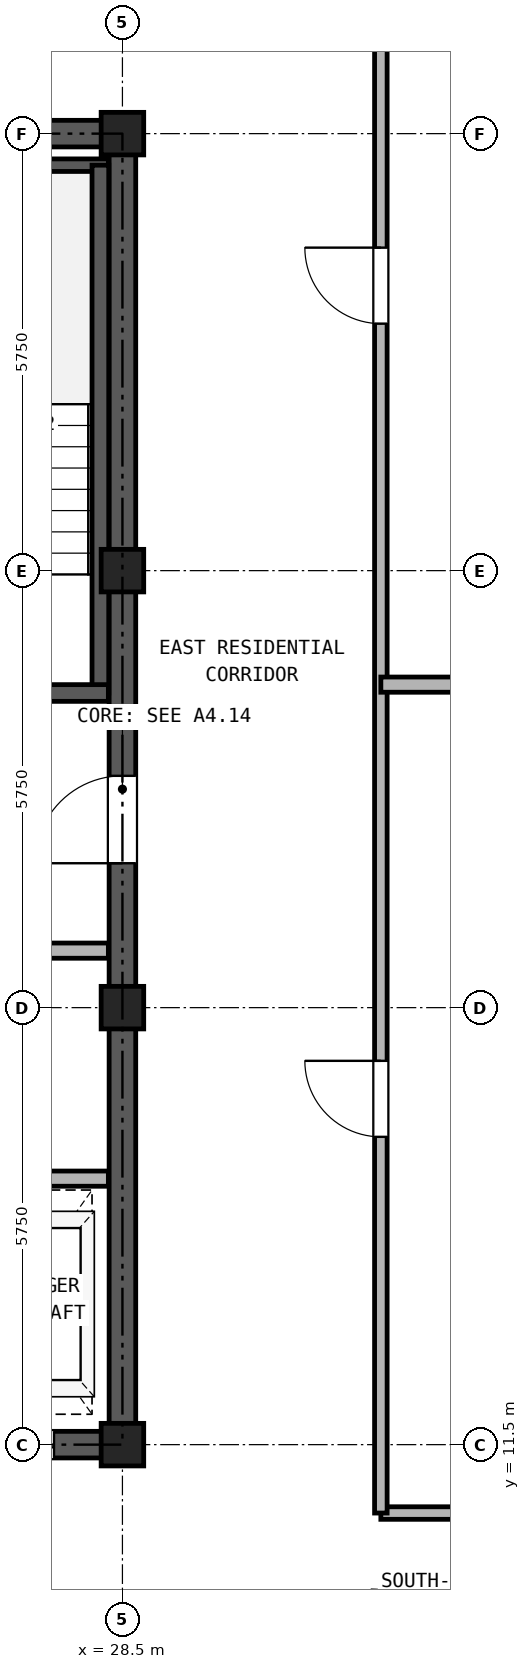
"""IFC4 building model, lengths in metres.
Left out: names, types, materials, properties, quantities, classifications, styles, units other than length and angle.
Written with IfcOpenShell. Run it as: python <this file> out.ifc"""

import sys

from ifc_helpers import new_model, si_unit, direction, frame, frame_2d, origin, origin_2d, place, context, subcontext, project, spatial, rectangle, hollow_rectangle, extrude, source, transform, mapped, element, fill, save


model = new_model("IFC4")
c1 = context("Model", 3, precision=1e-05, world=origin(), true_north=direction((0.0, 1.0)))
c2 = subcontext(c1, "Body", "Model", "MODEL_VIEW")
j1 = project(units=[si_unit("LENGTHUNIT", "METRE"), si_unit("PLANEANGLEUNIT", "RADIAN")], contexts=[c1])
p1 = place(None, origin())
s1 = spatial("IfcSite", under=j1, at=p1, CompositionType="ELEMENT")
p2 = place(p1, origin())
s2 = spatial("IfcBuilding", under=s1, at=p2, CompositionType="ELEMENT")
p3 = place(p2, frame((0.0, 0.0, 255.3)))
s3 = spatial("IfcBuildingStorey", under=s2, at=p3, CompositionType="ELEMENT", Elevation=255.3)
m1 = source(origin(), c2, "Body", "SweptSolid", [
    extrude(hollow_rectangle(XDim=0.56, YDim=0.56, WallThickness=0.03, at=origin_2d()), origin(), (0.0, 0.0, 1.0), 2.98),
])
for number, where, z_axis, x_axis in (
    (1, (28.5, 11.5, 0.0), (0.0, 0.0, 1.0), (1.0, 0.0, 0.0)),
    (2, (28.5, 17.25, 0.0), (0.0, 0.0, 1.0), (1.0, 0.0, 0.0)),
    (3, (28.5, 23.0, 0.0), (0.0, 0.0, 1.0), (1.0, 0.0, 0.0)),
    (4, (28.5, 28.75, 0.0), (0.0, 0.0, 1.0), (1.0, 0.0, 0.0)),
):
    element("IfcColumn", number, at=place(p3, frame(where, z_axis=z_axis, x_axis=x_axis)), inside=s3, PredefinedType="COLUMN", context=c2, shape_type="MappedRepresentation", body=[
        mapped(m1, transform((0.0, 0.0, 0.0), x_axis=(1.0, 0.0, 0.0), y_axis=(0.0, 1.0, 0.0), z_axis=(0.0, 0.0, 1.0), scale=1.0)),
    ])
p4 = place(p3, frame((18.325, 11.5, 0.0), z_axis=(0.0, 0.0, 1.0), x_axis=(1.0, 0.0, 0.0)))
e5 = element("IfcWall", 5, at=p4, inside=s3, PredefinedType="SHEAR", context=c2, shape_type="SweptSolid", body=[
    extrude(rectangle(XDim=10.35, YDim=0.35, at=frame_2d((5.175, 0.0))), origin(), (0.0, 0.0, 1.0), 2.98),
])
p5 = place(p4, frame((1.775, 0.0, 0.0)))
e6 = element("IfcOpeningElement", 6, at=p5, cuts=e5, PredefinedType="OPENING", context=c2, shape_type="SweptSolid", body=[
    extrude(rectangle(XDim=0.95, YDim=2.15, at=frame_2d((0.475, 1.075))), frame((0.0, 0.185, 0.0), z_axis=(0.0, -1.0, 0.0), x_axis=(1.0, 0.0, 0.0)), (0.0, 0.0, 1.0), 0.37),
])
p6 = place(p4, frame((5.275, 0.0, 0.0)))
e7 = element("IfcOpeningElement", 7, at=p6, cuts=e5, PredefinedType="OPENING", context=c2, shape_type="SweptSolid", body=[
    extrude(rectangle(XDim=0.95, YDim=2.15, at=frame_2d((0.475, 1.075))), frame((0.0, 0.185, 0.0), z_axis=(0.0, -1.0, 0.0), x_axis=(1.0, 0.0, 0.0)), (0.0, 0.0, 1.0), 0.37),
])
p7 = place(p4, frame((8.175, 0.0, 0.0)))
e8 = element("IfcOpeningElement", 8, at=p7, cuts=e5, PredefinedType="OPENING", context=c2, shape_type="SweptSolid", body=[
    extrude(rectangle(XDim=1.1, YDim=2.25, at=frame_2d((0.55, 1.125))), frame((0.0, 0.185, 0.0), z_axis=(0.0, -1.0, 0.0), x_axis=(1.0, 0.0, 0.0)), (0.0, 0.0, 1.0), 0.37),
])
p8 = place(p3, frame((18.325, 28.75, 0.0), z_axis=(0.0, 0.0, 1.0), x_axis=(1.0, 0.0, 0.0)))
e9 = element("IfcWall", 9, at=p8, inside=s3, PredefinedType="SHEAR", context=c2, shape_type="SweptSolid", body=[
    extrude(rectangle(XDim=10.35, YDim=0.35, at=frame_2d((5.175, 0.0))), origin(), (0.0, 0.0, 1.0), 2.98),
])
p9 = place(p8, frame((4.055, 0.0, 0.0)))
e10 = element("IfcOpeningElement", 10, at=p9, cuts=e9, PredefinedType="OPENING", context=c2, shape_type="SweptSolid", body=[
    extrude(rectangle(XDim=0.9, YDim=2.05, at=frame_2d((0.45, 1.025))), frame((0.0, 0.185, 0.0), z_axis=(0.0, -1.0, 0.0), x_axis=(1.0, 0.0, 0.0)), (0.0, 0.0, 1.0), 0.37),
])
p10 = place(p8, frame((5.595, 0.0, 0.0)))
e11 = element("IfcOpeningElement", 11, at=p10, cuts=e9, PredefinedType="OPENING", context=c2, shape_type="SweptSolid", body=[
    extrude(rectangle(XDim=0.9, YDim=2.05, at=frame_2d((0.45, 1.025))), frame((0.0, 0.185, 0.0), z_axis=(0.0, -1.0, 0.0), x_axis=(1.0, 0.0, 0.0)), (0.0, 0.0, 1.0), 0.37),
])
p11 = place(p3, frame((28.5, 11.675, 0.0), z_axis=(0.0, 0.0, 1.0), x_axis=(0.0, 1.0, 0.0)))
e12 = element("IfcWall", 12, at=p11, inside=s3, PredefinedType="SHEAR", context=c2, shape_type="SweptSolid", body=[
    extrude(rectangle(XDim=16.9, YDim=0.35, at=frame_2d((8.45, 0.0))), origin(), (0.0, 0.0, 1.0), 2.98),
])
p12 = place(p11, frame((7.475, 0.0, 0.0)))
e13 = element("IfcOpeningElement", 13, at=p12, cuts=e12, PredefinedType="OPENING", context=c2, shape_type="SweptSolid", body=[
    extrude(rectangle(XDim=1.15, YDim=2.2, at=frame_2d((0.575, 1.1))), frame((0.0, 0.185, 0.0), z_axis=(0.0, -1.0, 0.0), x_axis=(1.0, 0.0, 0.0)), (0.0, 0.0, 1.0), 0.37),
])
p13 = place(p3, frame((25.13, 28.335, 0.0), z_axis=(0.0, 0.0, 1.0), x_axis=(1.0, 0.0, 0.0)))
e14 = element("IfcWall", 14, at=p13, inside=s3, PredefinedType="PARTITIONING", context=c2, shape_type="SweptSolid", body=[
    extrude(rectangle(XDim=3.185, YDim=0.165, at=frame_2d((1.593, 0.0))), origin(), (0.0, 0.0, 1.0), 2.98),
])
p14 = place(p3, frame((28.21, 21.39, 0.0), z_axis=(0.0, 0.0, 1.0), x_axis=(0.0, 1.0, 0.0)))
e15 = element("IfcWall", 15, at=p14, inside=s3, PredefinedType="SOLIDWALL", context=c2, shape_type="SweptSolid", body=[
    extrude(rectangle(XDim=6.945, YDim=0.22, at=frame_2d((3.473, 0.0))), origin(), (0.0, 0.0, 1.0), 2.98),
])
p15 = place(p3, frame((25.13, 21.39, 0.0), z_axis=(0.0, 0.0, 1.0), x_axis=(1.0, 0.0, 0.0)))
e16 = element("IfcWall", 16, at=p15, inside=s3, PredefinedType="SOLIDWALL", context=c2, shape_type="SweptSolid", body=[
    extrude(rectangle(XDim=3.185, YDim=0.22, at=frame_2d((1.593, 0.0))), origin(), (0.0, 0.0, 1.0), 2.98),
])
p16 = place(p15, frame((0.92, 0.0, 0.0)))
e17 = element("IfcOpeningElement", 17, at=p16, cuts=e16, PredefinedType="OPENING", context=c2, shape_type="SweptSolid", body=[
    extrude(rectangle(XDim=1.15, YDim=2.2, at=frame_2d((0.575, 1.1))), frame((0.0, 0.12, 0.0), z_axis=(0.0, -1.0, 0.0), x_axis=(1.0, 0.0, 0.0)), (0.0, 0.0, 1.0), 0.24),
])
p17 = place(p3, frame((18.685, 18.0, 0.0), z_axis=(0.0, 0.0, 1.0), x_axis=(1.0, 0.0, 0.0)))
e18 = element("IfcWall", 18, at=p17, inside=s3, PredefinedType="PARTITIONING", context=c2, shape_type="SweptSolid", body=[
    extrude(rectangle(XDim=9.63, YDim=0.2, at=frame_2d((4.815, 0.0))), origin(), (0.0, 0.0, 1.0), 2.98),
])
p18 = place(p17, frame((0.565, 0.0, 0.0)))
e19 = element("IfcOpeningElement", 19, at=p18, cuts=e18, PredefinedType="OPENING", context=c2, shape_type="SweptSolid", body=[
    extrude(rectangle(XDim=1.3, YDim=2.3, at=frame_2d((0.65, 1.15))), frame((0.0, 0.11, 0.0), z_axis=(0.0, -1.0, 0.0), x_axis=(1.0, 0.0, 0.0)), (0.0, 0.0, 1.0), 0.22),
])
p19 = place(p17, frame((2.665, 0.0, 0.0)))
e20 = element("IfcOpeningElement", 20, at=p19, cuts=e18, PredefinedType="OPENING", context=c2, shape_type="SweptSolid", body=[
    extrude(rectangle(XDim=1.3, YDim=2.3, at=frame_2d((0.65, 1.15))), frame((0.0, 0.11, 0.0), z_axis=(0.0, -1.0, 0.0), x_axis=(1.0, 0.0, 0.0)), (0.0, 0.0, 1.0), 0.22),
])
p20 = place(p17, frame((7.165, 0.0, 0.0)))
e21 = element("IfcOpeningElement", 21, at=p20, cuts=e18, PredefinedType="OPENING", context=c2, shape_type="SweptSolid", body=[
    extrude(rectangle(XDim=1.0, YDim=2.15, at=frame_2d((0.5, 1.075))), frame((0.0, 0.11, 0.0), z_axis=(0.0, -1.0, 0.0), x_axis=(1.0, 0.0, 0.0)), (0.0, 0.0, 1.0), 0.22),
])
p21 = place(p3, frame((18.685, 15.0, 0.0), z_axis=(0.0, 0.0, 1.0), x_axis=(1.0, 0.0, 0.0)))
e22 = element("IfcWall", 22, at=p21, inside=s3, PredefinedType="PARTITIONING", context=c2, shape_type="SweptSolid", body=[
    extrude(rectangle(XDim=9.63, YDim=0.2, at=frame_2d((4.815, 0.0))), origin(), (0.0, 0.0, 1.0), 2.98),
])
p22 = place(p3, frame((31.9, 10.6, 0.0), z_axis=(0.0, 0.0, 1.0), x_axis=(1.0, 0.0, 0.0)))
e23 = element("IfcWall", 23, at=p22, inside=s3, PredefinedType="PARTITIONING", context=c2, shape_type="SweptSolid", body=[
    extrude(rectangle(XDim=6.3, YDim=0.165, at=frame_2d((3.15, 0.0))), origin(), (0.0, 0.0, 1.0), 2.98),
])
p23 = place(p3, frame((31.9, 10.6, 0.0), z_axis=(0.0, 0.0, 1.0), x_axis=(0.0, 1.0, 0.0)))
e24 = element("IfcWall", 24, at=p23, inside=s3, PredefinedType="PARTITIONING", context=c2, shape_type="SweptSolid", body=[
    extrude(rectangle(XDim=24.54, YDim=0.165, at=frame_2d((12.27, 0.0))), origin(), (0.0, 0.0, 1.0), 2.98),
])
p24 = place(p23, frame((4.95, 0.0, 0.0)))
e25 = element("IfcOpeningElement", 25, at=p24, cuts=e24, PredefinedType="OPENING", context=c2, shape_type="SweptSolid", body=[
    extrude(rectangle(XDim=1.0, YDim=2.15, at=frame_2d((0.5, 1.075))), frame((0.0, 0.093, 0.0), z_axis=(0.0, -1.0, 0.0), x_axis=(1.0, 0.0, 0.0)), (0.0, 0.0, 1.0), 0.185),
])
p25 = place(p23, frame((15.65, 0.0, 0.0)))
e26 = element("IfcOpeningElement", 26, at=p25, cuts=e24, PredefinedType="OPENING", context=c2, shape_type="SweptSolid", body=[
    extrude(rectangle(XDim=1.0, YDim=2.15, at=frame_2d((0.5, 1.075))), frame((0.0, 0.093, 0.0), z_axis=(0.0, -1.0, 0.0), x_axis=(1.0, 0.0, 0.0)), (0.0, 0.0, 1.0), 0.185),
])
p26 = place(p3, frame((31.9, 21.5, 0.0), z_axis=(0.0, 0.0, 1.0), x_axis=(1.0, 0.0, 0.0)))
e27 = element("IfcWall", 27, at=p26, inside=s3, PredefinedType="PARTITIONING", context=c2, shape_type="SweptSolid", body=[
    extrude(rectangle(XDim=9.74, YDim=0.2, at=frame_2d((4.87, 0.0))), origin(), (0.0, 0.0, 1.0), 2.98),
])
p27 = place(p12, origin())
e28 = element("IfcDoor", 28, at=p27, inside=s3, OperationType="SINGLE_SWING_LEFT", PredefinedType="DOOR", context=c2, shape_type="SweptSolid", body=[
    extrude(rectangle(XDim=1.15, YDim=2.2, at=frame_2d((0.575, 1.1))), frame((0.0, 0.025, 0.0), z_axis=(0.0, -1.0, 0.0), x_axis=(1.0, 0.0, 0.0)), (0.0, 0.0, 1.0), 0.05),
])
fill(e13, e28)
p28 = place(p7, frame((1.1, 0.0, 0.0), z_axis=(0.0, 0.0, 1.0), x_axis=(-1.0, 0.0, 0.0)))
e29 = element("IfcDoor", 29, at=p28, inside=s3, OperationType="DOUBLE_DOOR_SLIDING", PredefinedType="DOOR", context=c2, shape_type="SweptSolid", body=[
    extrude(rectangle(XDim=1.1, YDim=2.25, at=frame_2d((0.55, 1.125))), frame((0.0, 0.025, 0.0), z_axis=(0.0, -1.0, 0.0), x_axis=(1.0, 0.0, 0.0)), (0.0, 0.0, 1.0), 0.05),
])
fill(e8, e29)
p29 = place(p24, frame((1.0, 0.0, 0.0), z_axis=(0.0, 0.0, 1.0), x_axis=(-1.0, 0.0, 0.0)))
e30 = element("IfcDoor", 30, at=p29, inside=s3, OperationType="SINGLE_SWING_RIGHT", PredefinedType="DOOR", context=c2, shape_type="SweptSolid", body=[
    extrude(rectangle(XDim=1.0, YDim=2.15, at=frame_2d((0.5, 1.075))), frame((0.0, 0.025, 0.0), z_axis=(0.0, -1.0, 0.0), x_axis=(1.0, 0.0, 0.0)), (0.0, 0.0, 1.0), 0.05),
])
fill(e25, e30)
p30 = place(p25, frame((1.0, 0.0, 0.0), z_axis=(0.0, 0.0, 1.0), x_axis=(-1.0, 0.0, 0.0)))
e31 = element("IfcDoor", 31, at=p30, inside=s3, OperationType="SINGLE_SWING_RIGHT", PredefinedType="DOOR", context=c2, shape_type="SweptSolid", body=[
    extrude(rectangle(XDim=1.0, YDim=2.15, at=frame_2d((0.5, 1.075))), frame((0.0, 0.025, 0.0), z_axis=(0.0, -1.0, 0.0), x_axis=(1.0, 0.0, 0.0)), (0.0, 0.0, 1.0), 0.05),
])
fill(e26, e31)
save(model, sys.argv[1])
